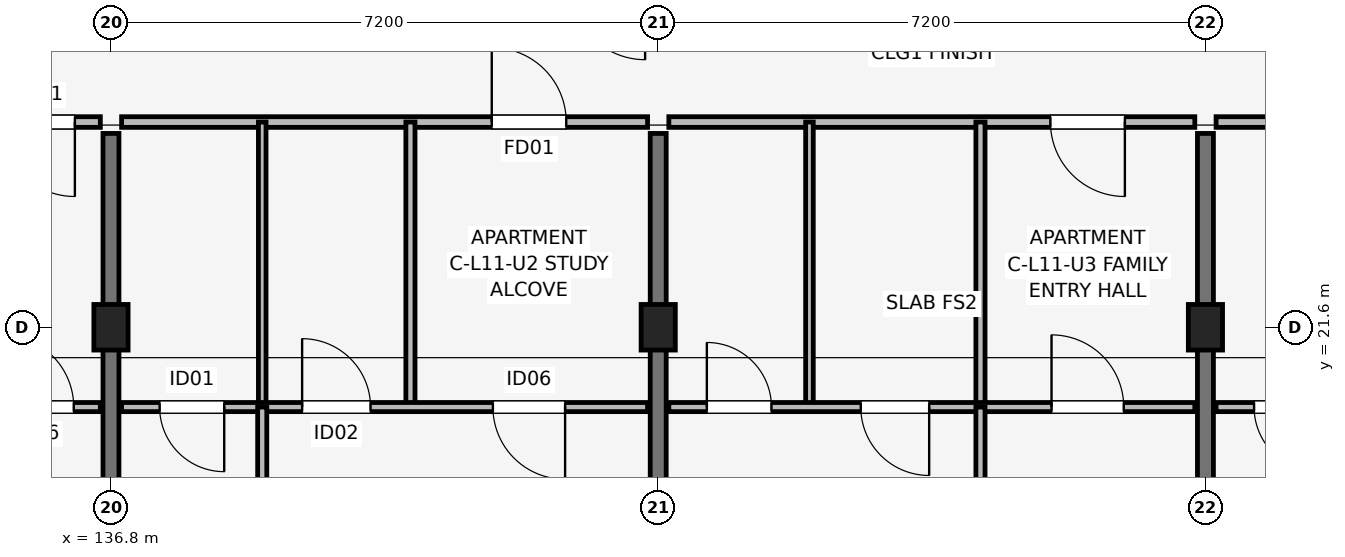
"""IFC4 building model, lengths in metres.
Left out: names, types, materials, properties, quantities, classifications, styles, units other than length and angle.
Written with IfcOpenShell. Run it as: python <this file> out.ifc"""

import sys

from ifc_helpers import new_model, si_unit, direction, frame, frame_2d, origin, origin_2d, place, context, subcontext, project, spatial, rectangle, extrude, element, fill, save


model = new_model("IFC4")
c1 = context("Model", 3, precision=1e-05, world=origin(), true_north=direction((0.0, 1.0)))
c2 = subcontext(c1, "Body", "Model", "MODEL_VIEW")
j1 = project(units=[si_unit("LENGTHUNIT", "METRE"), si_unit("PLANEANGLEUNIT", "RADIAN")], contexts=[c1])
p1 = place(None, origin())
s1 = spatial("IfcSite", under=j1, at=p1, CompositionType="ELEMENT")
p2 = place(p1, origin())
s2 = spatial("IfcBuilding", under=s1, at=p2, CompositionType="ELEMENT")
p3 = place(p2, frame((0.0, 0.0, 37.05)))
s3 = spatial("IfcBuildingStorey", under=s2, at=p3, CompositionType="ELEMENT", Elevation=37.05)
for number, where, z_axis, x_axis in (
    (1, (136.8, 21.6, 0.0), (0.0, 0.0, 1.0), (1.0, 0.0, 0.0)),
    (2, (144.0, 21.6, 0.0), (0.0, 0.0, 1.0), (1.0, 0.0, 0.0)),
    (3, (151.2, 21.6, 0.0), (0.0, 0.0, 1.0), (1.0, 0.0, 0.0)),
):
    element("IfcColumn", number, at=place(p3, frame(where, z_axis=z_axis, x_axis=x_axis)), inside=s3, PredefinedType="COLUMN", context=c2, shape_type="SweptSolid", body=[
        extrude(rectangle(XDim=0.45, YDim=0.6, at=origin_2d()), origin(), (0.0, 0.0, 1.0), 3.15),
    ])
for number, where, z_axis, x_axis in (
    (4, (136.8, 14.75, 0.0), (0.0, 0.0, 1.0), (0.0, 1.0, 0.0)),
    (5, (144.0, 14.75, 0.0), (0.0, 0.0, 1.0), (0.0, 1.0, 0.0)),
    (6, (151.2, 14.75, 0.0), (0.0, 0.0, 1.0), (0.0, 1.0, 0.0)),
):
    element("IfcWall", number, at=place(p3, frame(where, z_axis=z_axis, x_axis=x_axis)), inside=s3, PredefinedType="SHEAR", context=c2, shape_type="SweptSolid", body=[
        extrude(rectangle(XDim=9.4, YDim=0.21, at=frame_2d((4.7, 0.0))), origin(), (0.0, 0.0, 1.0), 3.15),
    ])
p4 = place(p3, frame((129.74, 24.3, 0.0), z_axis=(0.0, 0.0, 1.0), x_axis=(1.0, 0.0, 0.0)))
e7 = element("IfcWall", 7, at=p4, inside=s3, PredefinedType="PARTITIONING", context=c2, shape_type="SweptSolid", body=[
    extrude(rectangle(XDim=6.92, YDim=0.14, at=frame_2d((3.46, 0.0))), origin(), (0.0, 0.0, 1.0), 2.38),
])
p5 = place(p4, frame((6.585, 0.0, 0.0), z_axis=(0.0, 0.0, 1.0), x_axis=(-1.0, 0.0, 0.0)))
e8 = element("IfcOpeningElement", 8, at=p5, cuts=e7, PredefinedType="OPENING", context=c2, shape_type="SweptSolid", body=[
    extrude(rectangle(XDim=0.98, YDim=2.1, at=frame_2d((0.49, 1.05))), frame((0.0, 0.08, 0.0), z_axis=(0.0, -1.0, 0.0), x_axis=(1.0, 0.0, 0.0)), (0.0, 0.0, 1.0), 0.16),
])
p6 = place(p3, frame((129.74, 20.55, 0.0), z_axis=(0.0, 0.0, 1.0), x_axis=(1.0, 0.0, 0.0)))
e9 = element("IfcWall", 9, at=p6, inside=s3, PredefinedType="PARTITIONING", context=c2, shape_type="SweptSolid", body=[
    extrude(rectangle(XDim=6.92, YDim=0.12, at=frame_2d((3.46, 0.0))), origin(), (0.0, 0.0, 1.0), 2.38),
])
p7 = place(p6, frame((2.21, 0.0, 0.0)))
e10 = element("IfcOpeningElement", 10, at=p7, cuts=e9, PredefinedType="OPENING", context=c2, shape_type="SweptSolid", body=[
    extrude(rectangle(XDim=0.85, YDim=2.08, at=frame_2d((0.425, 1.04))), frame((0.0, 0.07, 0.0), z_axis=(0.0, -1.0, 0.0), x_axis=(1.0, 0.0, 0.0)), (0.0, 0.0, 1.0), 0.14),
])
p8 = place(p6, frame((4.865, 0.0, 0.0), z_axis=(0.0, 0.0, 1.0), x_axis=(-1.0, 0.0, 0.0)))
e11 = element("IfcOpeningElement", 11, at=p8, cuts=e9, PredefinedType="OPENING", context=c2, shape_type="SweptSolid", body=[
    extrude(rectangle(XDim=0.9, YDim=2.08, at=frame_2d((0.45, 1.04))), frame((0.0, 0.07, 0.0), z_axis=(0.0, -1.0, 0.0), x_axis=(1.0, 0.0, 0.0)), (0.0, 0.0, 1.0), 0.14),
])
p9 = place(p6, frame((5.62, 0.0, 0.0)))
e12 = element("IfcOpeningElement", 12, at=p9, cuts=e9, PredefinedType="OPENING", context=c2, shape_type="SweptSolid", body=[
    extrude(rectangle(XDim=0.95, YDim=2.08, at=frame_2d((0.475, 1.04))), frame((0.0, 0.07, 0.0), z_axis=(0.0, -1.0, 0.0), x_axis=(1.0, 0.0, 0.0)), (0.0, 0.0, 1.0), 0.14),
])
p10 = place(p3, frame((136.94, 24.3, 0.0), z_axis=(0.0, 0.0, 1.0), x_axis=(1.0, 0.0, 0.0)))
e13 = element("IfcWall", 13, at=p10, inside=s3, PredefinedType="PARTITIONING", context=c2, shape_type="SweptSolid", body=[
    extrude(rectangle(XDim=6.92, YDim=0.14, at=frame_2d((3.46, 0.0))), origin(), (0.0, 0.0, 1.0), 2.38),
])
p11 = place(p10, frame((4.87, 0.0, 0.0)))
e14 = element("IfcOpeningElement", 14, at=p11, cuts=e13, PredefinedType="OPENING", context=c2, shape_type="SweptSolid", body=[
    extrude(rectangle(XDim=0.98, YDim=2.1, at=frame_2d((0.49, 1.05))), frame((0.0, 0.08, 0.0), z_axis=(0.0, -1.0, 0.0), x_axis=(1.0, 0.0, 0.0)), (0.0, 0.0, 1.0), 0.16),
])
p12 = place(p3, frame((138.79, 20.55, 0.0), z_axis=(0.0, 0.0, 1.0), x_axis=(0.0, 1.0, 0.0)))
e15 = element("IfcWall", 15, at=p12, inside=s3, PredefinedType="PARTITIONING", context=c2, shape_type="SweptSolid", body=[
    extrude(rectangle(XDim=3.75, YDim=0.1, at=frame_2d((1.875, 0.0))), origin(), (0.0, 0.0, 1.0), 2.38),
])
p13 = place(p3, frame((140.74, 20.55, 0.0), z_axis=(0.0, 0.0, 1.0), x_axis=(0.0, 1.0, 0.0)))
e16 = element("IfcWall", 16, at=p13, inside=s3, PredefinedType="PARTITIONING", context=c2, shape_type="SweptSolid", body=[
    extrude(rectangle(XDim=3.75, YDim=0.12, at=frame_2d((1.875, 0.0))), origin(), (0.0, 0.0, 1.0), 2.38),
])
p14 = place(p3, frame((136.94, 20.55, 0.0), z_axis=(0.0, 0.0, 1.0), x_axis=(1.0, 0.0, 0.0)))
e17 = element("IfcWall", 17, at=p14, inside=s3, PredefinedType="PARTITIONING", context=c2, shape_type="SweptSolid", body=[
    extrude(rectangle(XDim=6.92, YDim=0.12, at=frame_2d((3.46, 0.0))), origin(), (0.0, 0.0, 1.0), 2.38),
])
p15 = place(p14, frame((1.35, 0.0, 0.0), z_axis=(0.0, 0.0, 1.0), x_axis=(-1.0, 0.0, 0.0)))
e18 = element("IfcOpeningElement", 18, at=p15, cuts=e17, PredefinedType="OPENING", context=c2, shape_type="SweptSolid", body=[
    extrude(rectangle(XDim=0.85, YDim=2.08, at=frame_2d((0.425, 1.04))), frame((0.0, 0.07, 0.0), z_axis=(0.0, -1.0, 0.0), x_axis=(1.0, 0.0, 0.0)), (0.0, 0.0, 1.0), 0.14),
])
p16 = place(p14, frame((2.375, 0.0, 0.0)))
e19 = element("IfcOpeningElement", 19, at=p16, cuts=e17, PredefinedType="OPENING", context=c2, shape_type="SweptSolid", body=[
    extrude(rectangle(XDim=0.9, YDim=2.08, at=frame_2d((0.45, 1.04))), frame((0.0, 0.07, 0.0), z_axis=(0.0, -1.0, 0.0), x_axis=(1.0, 0.0, 0.0)), (0.0, 0.0, 1.0), 0.14),
])
p17 = place(p14, frame((5.835, 0.0, 0.0), z_axis=(0.0, 0.0, 1.0), x_axis=(-1.0, 0.0, 0.0)))
e20 = element("IfcOpeningElement", 20, at=p17, cuts=e17, PredefinedType="OPENING", context=c2, shape_type="SweptSolid", body=[
    extrude(rectangle(XDim=0.95, YDim=2.08, at=frame_2d((0.475, 1.04))), frame((0.0, 0.07, 0.0), z_axis=(0.0, -1.0, 0.0), x_axis=(1.0, 0.0, 0.0)), (0.0, 0.0, 1.0), 0.14),
])
p18 = place(p3, frame((138.79, 14.7, 0.0), z_axis=(0.0, 0.0, 1.0), x_axis=(0.0, 1.0, 0.0)))
e21 = element("IfcWall", 21, at=p18, inside=s3, PredefinedType="PARTITIONING", context=c2, shape_type="SweptSolid", body=[
    extrude(rectangle(XDim=5.85, YDim=0.12, at=frame_2d((2.925, 0.0))), origin(), (0.0, 0.0, 1.0), 2.38),
])
p19 = place(p18, frame((2.475, 0.0, 0.0)))
e22 = element("IfcOpeningElement", 22, at=p19, cuts=e21, PredefinedType="OPENING", context=c2, shape_type="SweptSolid", body=[
    extrude(rectangle(XDim=0.9, YDim=2.08, at=frame_2d((0.45, 1.04))), frame((0.0, 0.07, 0.0), z_axis=(0.0, -1.0, 0.0), x_axis=(1.0, 0.0, 0.0)), (0.0, 0.0, 1.0), 0.14),
])
p20 = place(p3, frame((144.14, 24.3, 0.0), z_axis=(0.0, 0.0, 1.0), x_axis=(1.0, 0.0, 0.0)))
e23 = element("IfcWall", 23, at=p20, inside=s3, PredefinedType="PARTITIONING", context=c2, shape_type="SweptSolid", body=[
    extrude(rectangle(XDim=6.92, YDim=0.14, at=frame_2d((3.46, 0.0))), origin(), (0.0, 0.0, 1.0), 2.38),
])
p21 = place(p20, frame((6.0, 0.0, 0.0), z_axis=(0.0, 0.0, 1.0), x_axis=(-1.0, 0.0, 0.0)))
e24 = element("IfcOpeningElement", 24, at=p21, cuts=e23, PredefinedType="OPENING", context=c2, shape_type="SweptSolid", body=[
    extrude(rectangle(XDim=0.98, YDim=2.1, at=frame_2d((0.49, 1.05))), frame((0.0, 0.08, 0.0), z_axis=(0.0, -1.0, 0.0), x_axis=(1.0, 0.0, 0.0)), (0.0, 0.0, 1.0), 0.16),
])
p22 = place(p3, frame((145.99, 20.55, 0.0), z_axis=(0.0, 0.0, 1.0), x_axis=(0.0, 1.0, 0.0)))
e25 = element("IfcWall", 25, at=p22, inside=s3, PredefinedType="PARTITIONING", context=c2, shape_type="SweptSolid", body=[
    extrude(rectangle(XDim=3.75, YDim=0.1, at=frame_2d((1.875, 0.0))), origin(), (0.0, 0.0, 1.0), 2.38),
])
p23 = place(p3, frame((148.24, 20.55, 0.0), z_axis=(0.0, 0.0, 1.0), x_axis=(0.0, 1.0, 0.0)))
e26 = element("IfcWall", 26, at=p23, inside=s3, PredefinedType="PARTITIONING", context=c2, shape_type="SweptSolid", body=[
    extrude(rectangle(XDim=3.75, YDim=0.12, at=frame_2d((1.875, 0.0))), origin(), (0.0, 0.0, 1.0), 2.38),
])
p24 = place(p3, frame((144.14, 20.55, 0.0), z_axis=(0.0, 0.0, 1.0), x_axis=(1.0, 0.0, 0.0)))
e27 = element("IfcWall", 27, at=p24, inside=s3, PredefinedType="PARTITIONING", context=c2, shape_type="SweptSolid", body=[
    extrude(rectangle(XDim=6.92, YDim=0.12, at=frame_2d((3.46, 0.0))), origin(), (0.0, 0.0, 1.0), 2.38),
])
p25 = place(p24, frame((0.5, 0.0, 0.0)))
e28 = element("IfcOpeningElement", 28, at=p25, cuts=e27, PredefinedType="OPENING", context=c2, shape_type="SweptSolid", body=[
    extrude(rectangle(XDim=0.85, YDim=2.08, at=frame_2d((0.425, 1.04))), frame((0.0, 0.07, 0.0), z_axis=(0.0, -1.0, 0.0), x_axis=(1.0, 0.0, 0.0)), (0.0, 0.0, 1.0), 0.14),
])
p26 = place(p24, frame((3.425, 0.0, 0.0), z_axis=(0.0, 0.0, 1.0), x_axis=(-1.0, 0.0, 0.0)))
e29 = element("IfcOpeningElement", 29, at=p26, cuts=e27, PredefinedType="OPENING", context=c2, shape_type="SweptSolid", body=[
    extrude(rectangle(XDim=0.9, YDim=2.08, at=frame_2d((0.45, 1.04))), frame((0.0, 0.07, 0.0), z_axis=(0.0, -1.0, 0.0), x_axis=(1.0, 0.0, 0.0)), (0.0, 0.0, 1.0), 0.14),
])
p27 = place(p24, frame((5.035, 0.0, 0.0)))
e30 = element("IfcOpeningElement", 30, at=p27, cuts=e27, PredefinedType="OPENING", context=c2, shape_type="SweptSolid", body=[
    extrude(rectangle(XDim=0.95, YDim=2.08, at=frame_2d((0.475, 1.04))), frame((0.0, 0.07, 0.0), z_axis=(0.0, -1.0, 0.0), x_axis=(1.0, 0.0, 0.0)), (0.0, 0.0, 1.0), 0.14),
])
p28 = place(p3, frame((148.24, 14.7, 0.0), z_axis=(0.0, 0.0, 1.0), x_axis=(0.0, 1.0, 0.0)))
e31 = element("IfcWall", 31, at=p28, inside=s3, PredefinedType="PARTITIONING", context=c2, shape_type="SweptSolid", body=[
    extrude(rectangle(XDim=5.85, YDim=0.12, at=frame_2d((2.925, 0.0))), origin(), (0.0, 0.0, 1.0), 2.38),
])
p29 = place(p28, frame((3.375, 0.0, 0.0), z_axis=(0.0, 0.0, 1.0), x_axis=(-1.0, 0.0, 0.0)))
e32 = element("IfcOpeningElement", 32, at=p29, cuts=e31, PredefinedType="OPENING", context=c2, shape_type="SweptSolid", body=[
    extrude(rectangle(XDim=0.9, YDim=2.08, at=frame_2d((0.45, 1.04))), frame((0.0, 0.07, 0.0), z_axis=(0.0, -1.0, 0.0), x_axis=(1.0, 0.0, 0.0)), (0.0, 0.0, 1.0), 0.14),
])
p30 = place(p3, frame((151.34, 24.3, 0.0), z_axis=(0.0, 0.0, 1.0), x_axis=(1.0, 0.0, 0.0)))
e33 = element("IfcWall", 33, at=p30, inside=s3, PredefinedType="PARTITIONING", context=c2, shape_type="SweptSolid", body=[
    extrude(rectangle(XDim=6.92, YDim=0.14, at=frame_2d((3.46, 0.0))), origin(), (0.0, 0.0, 1.0), 2.38),
])
p31 = place(p30, frame((4.87, 0.0, 0.0)))
e34 = element("IfcOpeningElement", 34, at=p31, cuts=e33, PredefinedType="OPENING", context=c2, shape_type="SweptSolid", body=[
    extrude(rectangle(XDim=0.98, YDim=2.1, at=frame_2d((0.49, 1.05))), frame((0.0, 0.08, 0.0), z_axis=(0.0, -1.0, 0.0), x_axis=(1.0, 0.0, 0.0)), (0.0, 0.0, 1.0), 0.16),
])
p32 = place(p3, frame((151.34, 20.55, 0.0), z_axis=(0.0, 0.0, 1.0), x_axis=(1.0, 0.0, 0.0)))
e35 = element("IfcWall", 35, at=p32, inside=s3, PredefinedType="PARTITIONING", context=c2, shape_type="SweptSolid", body=[
    extrude(rectangle(XDim=6.92, YDim=0.12, at=frame_2d((3.46, 0.0))), origin(), (0.0, 0.0, 1.0), 2.38),
])
p33 = place(p32, frame((1.35, 0.0, 0.0), z_axis=(0.0, 0.0, 1.0), x_axis=(-1.0, 0.0, 0.0)))
e36 = element("IfcOpeningElement", 36, at=p33, cuts=e35, PredefinedType="OPENING", context=c2, shape_type="SweptSolid", body=[
    extrude(rectangle(XDim=0.85, YDim=2.08, at=frame_2d((0.425, 1.04))), frame((0.0, 0.07, 0.0), z_axis=(0.0, -1.0, 0.0), x_axis=(1.0, 0.0, 0.0)), (0.0, 0.0, 1.0), 0.14),
])
p34 = place(p32, frame((2.375, 0.0, 0.0)))
e37 = element("IfcOpeningElement", 37, at=p34, cuts=e35, PredefinedType="OPENING", context=c2, shape_type="SweptSolid", body=[
    extrude(rectangle(XDim=0.9, YDim=2.08, at=frame_2d((0.45, 1.04))), frame((0.0, 0.07, 0.0), z_axis=(0.0, -1.0, 0.0), x_axis=(1.0, 0.0, 0.0)), (0.0, 0.0, 1.0), 0.14),
])
p35 = place(p32, frame((5.835, 0.0, 0.0), z_axis=(0.0, 0.0, 1.0), x_axis=(-1.0, 0.0, 0.0)))
e38 = element("IfcOpeningElement", 38, at=p35, cuts=e35, PredefinedType="OPENING", context=c2, shape_type="SweptSolid", body=[
    extrude(rectangle(XDim=0.95, YDim=2.08, at=frame_2d((0.475, 1.04))), frame((0.0, 0.07, 0.0), z_axis=(0.0, -1.0, 0.0), x_axis=(1.0, 0.0, 0.0)), (0.0, 0.0, 1.0), 0.14),
])
p36 = place(p5, origin())
e39 = element("IfcDoor", 39, at=p36, inside=s3, OperationType="SINGLE_SWING_RIGHT", PredefinedType="DOOR", context=c2, shape_type="SweptSolid", body=[
    extrude(rectangle(XDim=0.98, YDim=2.1, at=frame_2d((0.49, 1.05))), frame((0.0, 0.025, 0.0), z_axis=(0.0, -1.0, 0.0), x_axis=(1.0, 0.0, 0.0)), (0.0, 0.0, 1.0), 0.05),
])
fill(e8, e39)
p37 = place(p9, origin())
e40 = element("IfcDoor", 40, at=p37, inside=s3, OperationType="SINGLE_SWING_LEFT", PredefinedType="DOOR", context=c2, shape_type="SweptSolid", body=[
    extrude(rectangle(XDim=0.95, YDim=2.08, at=frame_2d((0.475, 1.04))), frame((0.0, 0.025, 0.0), z_axis=(0.0, -1.0, 0.0), x_axis=(1.0, 0.0, 0.0)), (0.0, 0.0, 1.0), 0.05),
])
fill(e12, e40)
p38 = place(p11, origin())
e41 = element("IfcDoor", 41, at=p38, inside=s3, OperationType="SINGLE_SWING_LEFT", PredefinedType="DOOR", context=c2, shape_type="SweptSolid", body=[
    extrude(rectangle(XDim=0.98, YDim=2.1, at=frame_2d((0.49, 1.05))), frame((0.0, 0.025, 0.0), z_axis=(0.0, -1.0, 0.0), x_axis=(1.0, 0.0, 0.0)), (0.0, 0.0, 1.0), 0.05),
])
fill(e14, e41)
p39 = place(p15, origin())
e42 = element("IfcDoor", 42, at=p39, inside=s3, OperationType="SINGLE_SWING_RIGHT", PredefinedType="DOOR", context=c2, shape_type="SweptSolid", body=[
    extrude(rectangle(XDim=0.85, YDim=2.08, at=frame_2d((0.425, 1.04))), frame((0.0, 0.025, 0.0), z_axis=(0.0, -1.0, 0.0), x_axis=(1.0, 0.0, 0.0)), (0.0, 0.0, 1.0), 0.05),
])
fill(e18, e42)
p40 = place(p16, origin())
e43 = element("IfcDoor", 43, at=p40, inside=s3, OperationType="SINGLE_SWING_LEFT", PredefinedType="DOOR", context=c2, shape_type="SweptSolid", body=[
    extrude(rectangle(XDim=0.9, YDim=2.08, at=frame_2d((0.45, 1.04))), frame((0.0, 0.025, 0.0), z_axis=(0.0, -1.0, 0.0), x_axis=(1.0, 0.0, 0.0)), (0.0, 0.0, 1.0), 0.05),
])
fill(e19, e43)
p41 = place(p17, origin())
e44 = element("IfcDoor", 44, at=p41, inside=s3, OperationType="SINGLE_SWING_RIGHT", PredefinedType="DOOR", context=c2, shape_type="SweptSolid", body=[
    extrude(rectangle(XDim=0.95, YDim=2.08, at=frame_2d((0.475, 1.04))), frame((0.0, 0.025, 0.0), z_axis=(0.0, -1.0, 0.0), x_axis=(1.0, 0.0, 0.0)), (0.0, 0.0, 1.0), 0.05),
])
fill(e20, e44)
p42 = place(p21, origin())
e45 = element("IfcDoor", 45, at=p42, inside=s3, OperationType="SINGLE_SWING_RIGHT", PredefinedType="DOOR", context=c2, shape_type="SweptSolid", body=[
    extrude(rectangle(XDim=0.98, YDim=2.1, at=frame_2d((0.49, 1.05))), frame((0.0, 0.025, 0.0), z_axis=(0.0, -1.0, 0.0), x_axis=(1.0, 0.0, 0.0)), (0.0, 0.0, 1.0), 0.05),
])
fill(e24, e45)
p43 = place(p25, origin())
e46 = element("IfcDoor", 46, at=p43, inside=s3, OperationType="SINGLE_SWING_LEFT", PredefinedType="DOOR", context=c2, shape_type="SweptSolid", body=[
    extrude(rectangle(XDim=0.85, YDim=2.08, at=frame_2d((0.425, 1.04))), frame((0.0, 0.025, 0.0), z_axis=(0.0, -1.0, 0.0), x_axis=(1.0, 0.0, 0.0)), (0.0, 0.0, 1.0), 0.05),
])
fill(e28, e46)
p44 = place(p26, origin())
e47 = element("IfcDoor", 47, at=p44, inside=s3, OperationType="SINGLE_SWING_RIGHT", PredefinedType="DOOR", context=c2, shape_type="SweptSolid", body=[
    extrude(rectangle(XDim=0.9, YDim=2.08, at=frame_2d((0.45, 1.04))), frame((0.0, 0.025, 0.0), z_axis=(0.0, -1.0, 0.0), x_axis=(1.0, 0.0, 0.0)), (0.0, 0.0, 1.0), 0.05),
])
fill(e29, e47)
p45 = place(p27, origin())
e48 = element("IfcDoor", 48, at=p45, inside=s3, OperationType="SINGLE_SWING_LEFT", PredefinedType="DOOR", context=c2, shape_type="SweptSolid", body=[
    extrude(rectangle(XDim=0.95, YDim=2.08, at=frame_2d((0.475, 1.04))), frame((0.0, 0.025, 0.0), z_axis=(0.0, -1.0, 0.0), x_axis=(1.0, 0.0, 0.0)), (0.0, 0.0, 1.0), 0.05),
])
fill(e30, e48)
p46 = place(p33, origin())
e49 = element("IfcDoor", 49, at=p46, inside=s3, OperationType="SINGLE_SWING_RIGHT", PredefinedType="DOOR", context=c2, shape_type="SweptSolid", body=[
    extrude(rectangle(XDim=0.85, YDim=2.08, at=frame_2d((0.425, 1.04))), frame((0.0, 0.025, 0.0), z_axis=(0.0, -1.0, 0.0), x_axis=(1.0, 0.0, 0.0)), (0.0, 0.0, 1.0), 0.05),
])
fill(e36, e49)
save(model, sys.argv[1])
